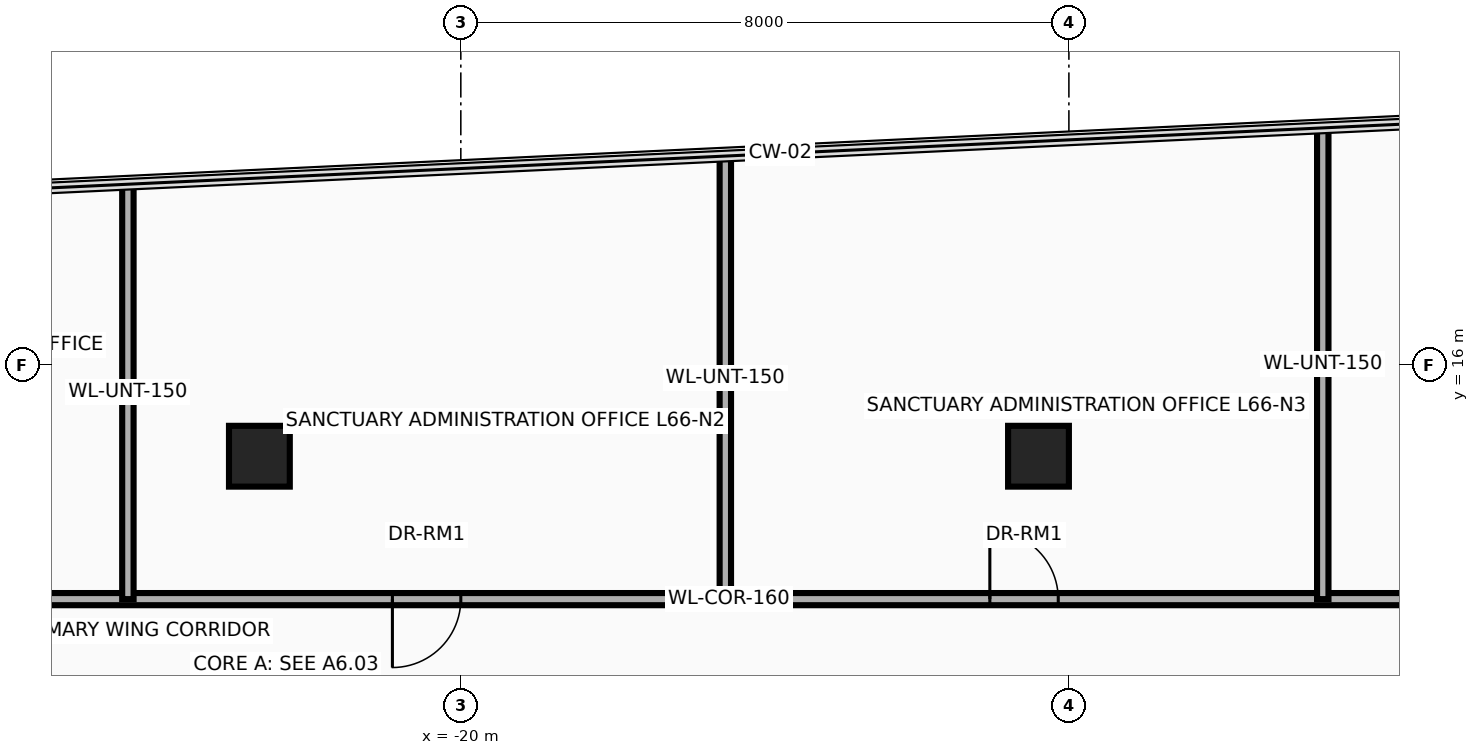
"""IFC4 building model, lengths in metres.
Left out: names, types, materials, properties, quantities, classifications, styles, units other than length and angle.
Written with IfcOpenShell. Run it as: python <this file> out.ifc"""

import sys

from ifc_helpers import new_model, si_unit, direction, frame, frame_2d, origin, origin_2d, place, context, subcontext, project, spatial, rectangle, extrude, source, transform, mapped, element, fill, save


model = new_model("IFC4")
c1 = context("Model", 3, precision=1e-05, world=origin(), true_north=direction((0.0, 1.0)))
c2 = subcontext(c1, "Body", "Model", "MODEL_VIEW")
j1 = project(units=[si_unit("LENGTHUNIT", "METRE"), si_unit("PLANEANGLEUNIT", "RADIAN")], contexts=[c1])
p1 = place(None, origin())
s1 = spatial("IfcSite", under=j1, at=p1, CompositionType="ELEMENT")
p2 = place(p1, origin())
s2 = spatial("IfcBuilding", under=s1, at=p2, CompositionType="ELEMENT")
p3 = place(p2, frame((0.0, 0.0, 254.5)))
s3 = spatial("IfcBuildingStorey", under=s2, at=p3, CompositionType="ELEMENT", Elevation=254.5)
m1 = source(origin(), c2, "Body", "SweptSolid", [
    extrude(rectangle(XDim=0.8, YDim=0.8, at=origin_2d()), origin(), (0.0, 0.0, 1.0), 3.5),
])
for number, where, z_axis, x_axis in (
    (1, (-22.65, 14.8, 0.0), (0.0, 0.0, 1.0), (1.0, 0.0, 0.0)),
    (2, (-12.4, 14.8, 0.0), (0.0, 0.0, 1.0), (1.0, 0.0, 0.0)),
):
    element("IfcColumn", number, at=place(p3, frame(where, z_axis=z_axis, x_axis=x_axis)), inside=s3, PredefinedType="COLUMN", context=c2, shape_type="MappedRepresentation", body=[
        mapped(m1, transform((0.0, 0.0, 0.0), x_axis=(1.0, 0.0, 0.0), y_axis=(0.0, 1.0, 0.0), z_axis=(0.0, 0.0, 1.0), scale=1.0)),
    ])
p4 = place(p3, frame((-32.04, 12.92, 0.0), z_axis=(0.0, 0.0, 1.0), x_axis=(1.0, 0.0, 0.0)))
e3 = element("IfcWall", 3, at=p4, inside=s3, PredefinedType="PARTITIONING", context=c2, shape_type="SweptSolid", body=[
    extrude(rectangle(XDim=31.13, YDim=0.16, at=frame_2d((15.565, 0.0))), origin(), (0.0, 0.0, 1.0), 2.634),
])
p5 = place(p4, frame((3.38, 0.0, 0.0)))
e4 = element("IfcOpeningElement", 4, at=p5, cuts=e3, PredefinedType="OPENING", context=c2, shape_type="SweptSolid", body=[
    extrude(rectangle(XDim=0.9, YDim=2.1, at=frame_2d((0.45, 1.05))), frame((0.0, 0.095, 0.0), z_axis=(0.0, -1.0, 0.0), x_axis=(1.0, 0.0, 0.0)), (0.0, 0.0, 1.0), 0.19),
])
p6 = place(p4, frame((11.14, 0.0, 0.0)))
e5 = element("IfcOpeningElement", 5, at=p6, cuts=e3, PredefinedType="OPENING", context=c2, shape_type="SweptSolid", body=[
    extrude(rectangle(XDim=0.9, YDim=2.1, at=frame_2d((0.45, 1.05))), frame((0.0, 0.095, 0.0), z_axis=(0.0, -1.0, 0.0), x_axis=(1.0, 0.0, 0.0)), (0.0, 0.0, 1.0), 0.19),
])
p7 = place(p4, frame((19.0, 0.0, 0.0)))
e6 = element("IfcOpeningElement", 6, at=p7, cuts=e3, PredefinedType="OPENING", context=c2, shape_type="SweptSolid", body=[
    extrude(rectangle(XDim=0.9, YDim=2.1, at=frame_2d((0.45, 1.05))), frame((0.0, 0.095, 0.0), z_axis=(0.0, -1.0, 0.0), x_axis=(1.0, 0.0, 0.0)), (0.0, 0.0, 1.0), 0.19),
])
p8 = place(p4, frame((26.805, 0.0, 0.0)))
e7 = element("IfcOpeningElement", 7, at=p8, cuts=e3, PredefinedType="OPENING", context=c2, shape_type="SweptSolid", body=[
    extrude(rectangle(XDim=0.9, YDim=2.1, at=frame_2d((0.45, 1.05))), frame((0.0, 0.095, 0.0), z_axis=(0.0, -1.0, 0.0), x_axis=(1.0, 0.0, 0.0)), (0.0, 0.0, 1.0), 0.19),
])
p9 = place(p3, frame((-24.38, 12.92, 0.0), z_axis=(0.0, 0.0, 1.0), x_axis=(0.0, 1.0, 0.0)))
e8 = element("IfcWall", 8, at=p9, inside=s3, PredefinedType="PARTITIONING", context=c2, shape_type="SweptSolid", body=[
    extrude(rectangle(XDim=5.458, YDim=0.15, at=frame_2d((2.729, 0.0))), origin(), (0.0, 0.0, 1.0), 2.544),
])
p10 = place(p3, frame((-16.52, 12.92, 0.0), z_axis=(0.0, 0.0, 1.0), x_axis=(0.0, 1.0, 0.0)))
e9 = element("IfcWall", 9, at=p10, inside=s3, PredefinedType="PARTITIONING", context=c2, shape_type="SweptSolid", body=[
    extrude(rectangle(XDim=5.829, YDim=0.15, at=frame_2d((2.915, 0.0))), origin(), (0.0, 0.0, 1.0), 2.544),
])
p11 = place(p3, frame((-8.66, 12.92, 0.0), z_axis=(0.0, 0.0, 1.0), x_axis=(0.0, 1.0, 0.0)))
e10 = element("IfcWall", 10, at=p11, inside=s3, PredefinedType="PARTITIONING", context=c2, shape_type="SweptSolid", body=[
    extrude(rectangle(XDim=6.199, YDim=0.15, at=frame_2d((3.1, 0.0))), origin(), (0.0, 0.0, 1.0), 3.26),
])
p12 = place(p6, frame((0.9, 0.0, 0.0), z_axis=(0.0, 0.0, 1.0), x_axis=(-1.0, 0.0, 0.0)))
e11 = element("IfcDoor", 11, at=p12, inside=s3, OperationType="SINGLE_SWING_LEFT", PredefinedType="DOOR", context=c2, shape_type="SweptSolid", body=[
    extrude(rectangle(XDim=0.9, YDim=2.1, at=frame_2d((0.45, 1.05))), frame((0.0, 0.025, 0.0), z_axis=(0.0, -1.0, 0.0), x_axis=(1.0, 0.0, 0.0)), (0.0, 0.0, 1.0), 0.05),
])
fill(e5, e11)
p13 = place(p7, origin())
e12 = element("IfcDoor", 12, at=p13, inside=s3, OperationType="SINGLE_SWING_RIGHT", PredefinedType="DOOR", context=c2, shape_type="SweptSolid", body=[
    extrude(rectangle(XDim=0.9, YDim=2.1, at=frame_2d((0.45, 1.05))), frame((0.0, 0.025, 0.0), z_axis=(0.0, -1.0, 0.0), x_axis=(1.0, 0.0, 0.0)), (0.0, 0.0, 1.0), 0.05),
])
fill(e6, e12)
save(model, sys.argv[1])
